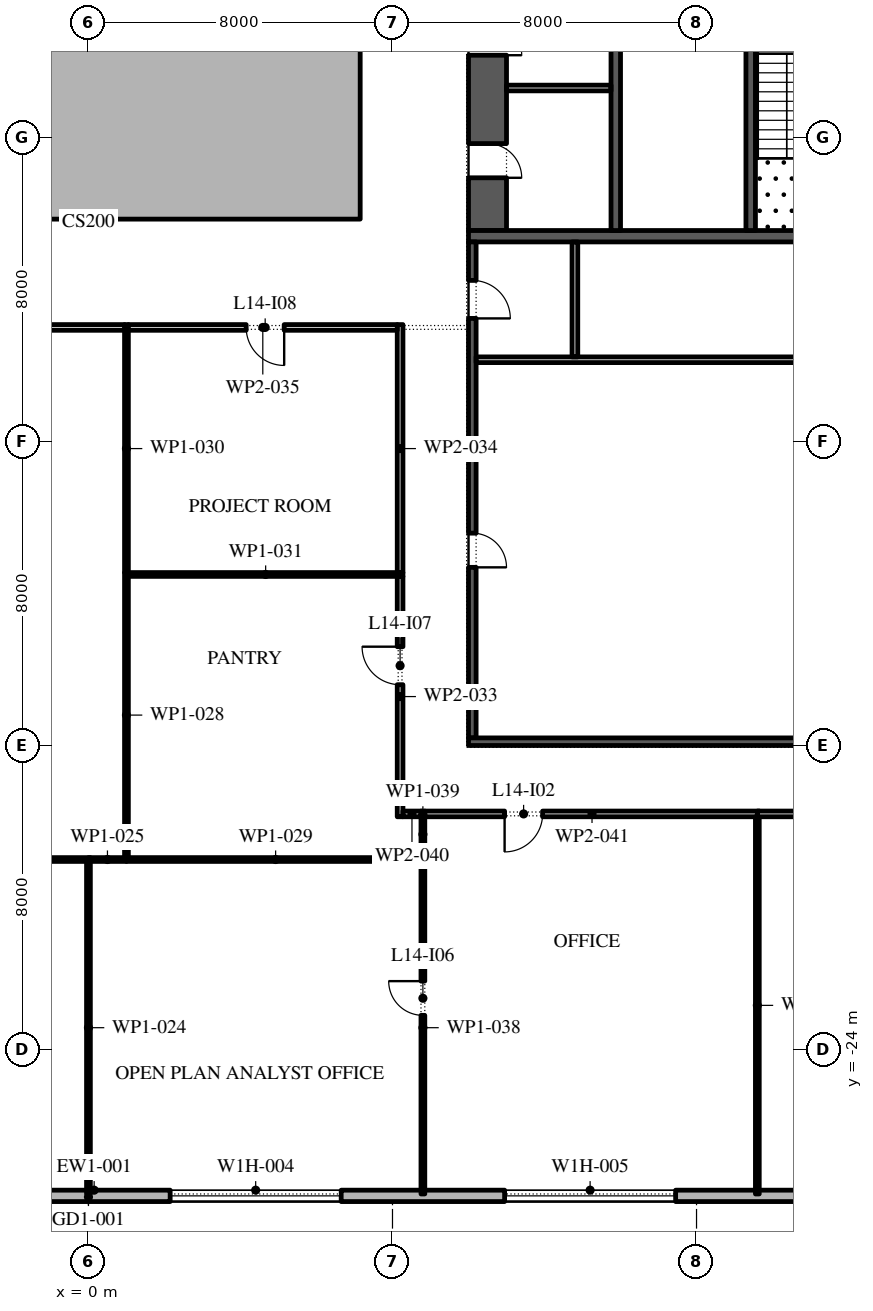
"""IFC4 building model, lengths in metres.
Left out: names, types, materials, properties, quantities, classifications, styles, units other than length and angle.
Written with IfcOpenShell. Run it as: python <this file> out.ifc"""

import sys

from ifc_helpers import new_model, si_unit, direction, frame, frame_2d, origin, place, context, subcontext, project, spatial, polyline, rectangle, outline, extrude, element, fill, save


model = new_model("IFC4")
c1 = context("Model", 3, precision=1e-05, world=origin(), true_north=direction((0.0, 1.0)))
c2 = subcontext(c1, "Body", "Model", "MODEL_VIEW")
j1 = project(units=[si_unit("LENGTHUNIT", "METRE"), si_unit("PLANEANGLEUNIT", "RADIAN")], contexts=[c1])
p1 = place(None, origin())
s1 = spatial("IfcSite", under=j1, at=p1, CompositionType="ELEMENT")
p2 = place(p1, origin())
s2 = spatial("IfcBuilding", under=s1, at=p2, CompositionType="ELEMENT")
p3 = place(p2, frame((0.0, 0.0, 69.0)))
s3 = spatial("IfcBuildingStorey", under=s2, at=p3, CompositionType="ELEMENT", Elevation=69.0)
p4 = place(p3, origin())
e1 = element("IfcWall", 1, at=p4, inside=s3, PredefinedType="STANDARD", context=c2, shape_type="SweptSolid", body=[
    extrude(outline(polyline([(-7.15, -2.15), (7.15, -2.15), (7.15, 16.15), (-7.15, 16.15), (-7.15, -2.15)]), holes=[polyline([(-7.0, -2.0), (-7.0, 16.0), (7.0, 16.0), (7.0, -2.0), (-7.0, -2.0)])]), origin(), (0.0, 0.0, 1.0), 4.0),
])
p5 = place(p3, frame((-26.1, -27.85, 0.0), z_axis=(0.0, 0.0, 1.0), x_axis=(1.0, 0.0, 0.0)))
e2 = element("IfcWall", 2, at=p5, inside=s3, PredefinedType="STANDARD", context=c2, shape_type="SweptSolid", body=[
    extrude(rectangle(XDim=52.5, YDim=0.3, at=frame_2d((26.25, 0.0))), origin(), (0.0, 0.0, 1.0), 4.0),
])
p6 = place(p5, frame((2.0, 0.0, 0.45)))
e3 = element("IfcOpeningElement", 3, at=p6, cuts=e2, PredefinedType="OPENING", context=c2, shape_type="SweptSolid", body=[
    extrude(rectangle(XDim=4.5, YDim=2.75, at=frame_2d((2.25, 1.375))), frame((0.0, 0.16, 0.0), z_axis=(0.0, -1.0, 0.0), x_axis=(1.0, 0.0, 0.0)), (0.0, 0.0, 1.0), 0.32),
])
p7 = place(p5, frame((10.65, 0.0, 0.45)))
e4 = element("IfcOpeningElement", 4, at=p7, cuts=e2, PredefinedType="OPENING", context=c2, shape_type="SweptSolid", body=[
    extrude(rectangle(XDim=4.5, YDim=2.75, at=frame_2d((2.25, 1.375))), frame((0.0, 0.16, 0.0), z_axis=(0.0, -1.0, 0.0), x_axis=(1.0, 0.0, 0.0)), (0.0, 0.0, 1.0), 0.32),
])
p8 = place(p5, frame((20.5, 0.0, 0.0)))
e5 = element("IfcOpeningElement", 5, at=p8, cuts=e2, PredefinedType="OPENING", context=c2, shape_type="SweptSolid", body=[
    extrude(rectangle(XDim=2.4, YDim=3.5, at=frame_2d((1.2, 1.75))), frame((0.0, 0.16, 0.0), z_axis=(0.0, -1.0, 0.0), x_axis=(1.0, 0.0, 0.0)), (0.0, 0.0, 1.0), 0.32),
])
p9 = place(p5, frame((28.25, 0.0, 0.45)))
e6 = element("IfcOpeningElement", 6, at=p9, cuts=e2, PredefinedType="OPENING", context=c2, shape_type="SweptSolid", body=[
    extrude(rectangle(XDim=4.5, YDim=2.75, at=frame_2d((2.25, 1.375))), frame((0.0, 0.16, 0.0), z_axis=(0.0, -1.0, 0.0), x_axis=(1.0, 0.0, 0.0)), (0.0, 0.0, 1.0), 0.32),
])
p10 = place(p5, frame((37.05, 0.0, 0.45)))
e7 = element("IfcOpeningElement", 7, at=p10, cuts=e2, PredefinedType="OPENING", context=c2, shape_type="SweptSolid", body=[
    extrude(rectangle(XDim=4.5, YDim=2.75, at=frame_2d((2.25, 1.375))), frame((0.0, 0.16, 0.0), z_axis=(0.0, -1.0, 0.0), x_axis=(1.0, 0.0, 0.0)), (0.0, 0.0, 1.0), 0.32),
])
p11 = place(p5, frame((45.85, 0.0, 0.45)))
e8 = element("IfcOpeningElement", 8, at=p11, cuts=e2, PredefinedType="OPENING", context=c2, shape_type="SweptSolid", body=[
    extrude(rectangle(XDim=4.5, YDim=2.75, at=frame_2d((2.25, 1.375))), frame((0.0, 0.16, 0.0), z_axis=(0.0, -1.0, 0.0), x_axis=(1.0, 0.0, 0.0)), (0.0, 0.0, 1.0), 0.32),
])
p12 = place(p3, frame((10.5, -2.45, 0.0), z_axis=(0.0, 0.0, 1.0), x_axis=(0.0, 1.0, 0.0)))
e9 = element("IfcWall", 9, at=p12, inside=s3, PredefinedType="SHEAR", context=c2, shape_type="SweptSolid", body=[
    extrude(rectangle(XDim=27.9, YDim=1.0, at=frame_2d((13.95, 0.0))), origin(), (0.0, 0.0, 1.0), 4.0),
])
p13 = place(p12, frame((23.65, 0.0, 0.0)))
e10 = element("IfcOpeningElement", 10, at=p13, cuts=e9, PredefinedType="OPENING", context=c2, shape_type="SweptSolid", body=[
    extrude(rectangle(XDim=2.4, YDim=2.1, at=frame_2d((1.2, 1.05))), frame((0.0, 0.51, 0.0), z_axis=(0.0, -1.0, 0.0), x_axis=(1.0, 0.0, 0.0)), (0.0, 0.0, 1.0), 1.02),
])
p14 = place(p12, frame((1.387, 0.0, 0.0)))
e11 = element("IfcOpeningElement", 11, at=p14, cuts=e9, PredefinedType="OPENING", context=c2, shape_type="SweptSolid", body=[
    extrude(rectangle(XDim=0.9, YDim=2.1, at=frame_2d((0.45, 1.05))), frame((0.0, 0.51, 0.0), z_axis=(0.0, -1.0, 0.0), x_axis=(1.0, 0.0, 0.0)), (0.0, 0.0, 1.0), 1.02),
])
p15 = place(p12, frame((4.613, 0.0, 0.0)))
e12 = element("IfcOpeningElement", 12, at=p15, cuts=e9, PredefinedType="OPENING", context=c2, shape_type="SweptSolid", body=[
    extrude(rectangle(XDim=0.9, YDim=2.1, at=frame_2d((0.45, 1.05))), frame((0.0, 0.51, 0.0), z_axis=(0.0, -1.0, 0.0), x_axis=(1.0, 0.0, 0.0)), (0.0, 0.0, 1.0), 1.02),
])
p16 = place(p3, frame((10.0, -2.6, 0.0), z_axis=(0.0, 0.0, 1.0), x_axis=(1.0, 0.0, 0.0)))
e13 = element("IfcWall", 13, at=p16, inside=s3, PredefinedType="SHEAR", context=c2, shape_type="SweptSolid", body=[
    extrude(rectangle(XDim=12.0, YDim=0.3, at=frame_2d((6.0, 0.0))), origin(), (0.0, 0.0, 1.0), 4.0),
])
p17 = place(p3, frame((17.425, -2.45, 0.0), z_axis=(0.0, 0.0, 1.0), x_axis=(0.0, 1.0, 0.0)))
e14 = element("IfcWall", 14, at=p17, inside=s3, PredefinedType="SHEAR", context=c2, shape_type="SweptSolid", body=[
    extrude(rectangle(XDim=6.3, YDim=0.25, at=frame_2d((3.15, 0.0))), origin(), (0.0, 0.0, 1.0), 4.0),
])
p18 = place(p17, frame((5.05, 0.0, 0.0)))
e15 = element("IfcOpeningElement", 15, at=p18, cuts=e14, PredefinedType="OPENING", context=c2, shape_type="SweptSolid", body=[
    extrude(rectangle(XDim=1.2, YDim=2.1, at=frame_2d((0.6, 1.05))), frame((0.0, 0.135, 0.0), z_axis=(0.0, -1.0, 0.0), x_axis=(1.0, 0.0, 0.0)), (0.0, 0.0, 1.0), 0.27),
])
p19 = place(p3, frame((13.875, -2.45, 0.0), z_axis=(0.0, 0.0, 1.0), x_axis=(0.0, 1.0, 0.0)))
e16 = element("IfcWall", 16, at=p19, inside=s3, PredefinedType="SHEAR", context=c2, shape_type="SweptSolid", body=[
    extrude(rectangle(XDim=21.3, YDim=0.25, at=frame_2d((10.65, 0.0))), origin(), (0.0, 0.0, 1.0), 4.0),
])
p20 = place(p19, frame((11.446, 0.0, 0.0)))
e17 = element("IfcOpeningElement", 17, at=p20, cuts=e16, PredefinedType="OPENING", context=c2, shape_type="SweptSolid", body=[
    extrude(rectangle(XDim=0.9, YDim=2.1, at=frame_2d((0.45, 1.05))), frame((0.0, 0.135, 0.0), z_axis=(0.0, -1.0, 0.0), x_axis=(1.0, 0.0, 0.0)), (0.0, 0.0, 1.0), 0.27),
])
p21 = place(p19, frame((17.725, 0.0, 0.0)))
e18 = element("IfcOpeningElement", 18, at=p21, cuts=e16, PredefinedType="OPENING", context=c2, shape_type="SweptSolid", body=[
    extrude(rectangle(XDim=0.9, YDim=2.1, at=frame_2d((0.45, 1.05))), frame((0.0, 0.135, 0.0), z_axis=(0.0, -1.0, 0.0), x_axis=(1.0, 0.0, 0.0)), (0.0, 0.0, 1.0), 0.27),
])
p22 = place(p19, frame((6.971, 0.0, 0.0)))
e19 = element("IfcOpeningElement", 19, at=p22, cuts=e16, PredefinedType="OPENING", context=c2, shape_type="SweptSolid", body=[
    extrude(rectangle(XDim=1.1, YDim=2.1, at=frame_2d((0.55, 1.05))), frame((0.0, 0.135, 0.0), z_axis=(0.0, -1.0, 0.0), x_axis=(1.0, 0.0, 0.0)), (0.0, 0.0, 1.0), 0.27),
])
p23 = place(p3, frame((11.0, 1.3, 0.0), z_axis=(0.0, 0.0, 1.0), x_axis=(1.0, 0.0, 0.0)))
e20 = element("IfcWall", 20, at=p23, inside=s3, PredefinedType="PARTITIONING", context=c2, shape_type="SweptSolid", body=[
    extrude(rectangle(XDim=2.75, YDim=0.15, at=frame_2d((1.375, 0.0))), origin(), (0.0, 0.0, 1.0), 4.0),
])
p24 = place(p3, frame((10.1, -15.8, 0.0), z_axis=(0.0, 0.0, 1.0), x_axis=(0.0, 1.0, 0.0)))
e21 = element("IfcWall", 21, at=p24, inside=s3, PredefinedType="SHEAR", context=c2, shape_type="SweptSolid", body=[
    extrude(rectangle(XDim=13.05, YDim=0.2, at=frame_2d((6.525, 0.0))), origin(), (0.0, 0.0, 1.0), 4.0),
])
p25 = place(p24, frame((4.488, 0.0, 0.0)))
e22 = element("IfcOpeningElement", 22, at=p25, cuts=e21, PredefinedType="OPENING", context=c2, shape_type="SweptSolid", body=[
    extrude(rectangle(XDim=0.9, YDim=2.1, at=frame_2d((0.45, 1.05))), frame((0.0, 0.11, 0.0), z_axis=(0.0, -1.0, 0.0), x_axis=(1.0, 0.0, 0.0)), (0.0, 0.0, 1.0), 0.22),
])
p26 = place(p24, frame((11.038, 0.0, 0.0)))
e23 = element("IfcOpeningElement", 23, at=p26, cuts=e21, PredefinedType="OPENING", context=c2, shape_type="SweptSolid", body=[
    extrude(rectangle(XDim=1.0, YDim=2.1, at=frame_2d((0.5, 1.05))), frame((0.0, 0.11, 0.0), z_axis=(0.0, -1.0, 0.0), x_axis=(1.0, 0.0, 0.0)), (0.0, 0.0, 1.0), 0.22),
])
p27 = place(p3, frame((10.0, -15.9, 0.0), z_axis=(0.0, 0.0, 1.0), x_axis=(1.0, 0.0, 0.0)))
e24 = element("IfcWall", 24, at=p27, inside=s3, PredefinedType="SHEAR", context=c2, shape_type="SweptSolid", body=[
    extrude(rectangle(XDim=12.0, YDim=0.2, at=frame_2d((6.0, 0.0))), origin(), (0.0, 0.0, 1.0), 4.0),
])
p28 = place(p3, frame((10.2, -5.85, 0.0), z_axis=(0.0, 0.0, 1.0), x_axis=(1.0, 0.0, 0.0)))
e25 = element("IfcWall", 25, at=p28, inside=s3, PredefinedType="PARTITIONING", context=c2, shape_type="SweptSolid", body=[
    extrude(rectangle(XDim=11.6, YDim=0.15, at=frame_2d((5.8, 0.0))), origin(), (0.0, 0.0, 1.0), 4.0),
])
p29 = place(p3, frame((12.8, -5.775, 0.0), z_axis=(0.0, 0.0, 1.0), x_axis=(0.0, 1.0, 0.0)))
e26 = element("IfcWall", 26, at=p29, inside=s3, PredefinedType="PARTITIONING", context=c2, shape_type="SweptSolid", body=[
    extrude(rectangle(XDim=3.025, YDim=0.15, at=frame_2d((1.512, 0.0))), origin(), (0.0, 0.0, 1.0), 4.0),
])
p30 = place(p3, frame((-8.75, -19.0, 0.0), z_axis=(0.0, 0.0, 1.0), x_axis=(1.0, 0.0, 0.0)))
e27 = element("IfcWall", 27, at=p30, inside=s3, PredefinedType="PARTITIONING", context=c2, shape_type="SweptSolid", body=[
    extrude(rectangle(XDim=8.8, YDim=0.1, at=frame_2d((4.4, 0.0))), origin(), (0.0, 0.0, 1.0), 4.0),
])
p31 = place(p3, frame((0.0, -19.05, 0.0), z_axis=(0.0, 0.0, 1.0), x_axis=(0.0, -1.0, 0.0)))
e28 = element("IfcWall", 28, at=p31, inside=s3, PredefinedType="PARTITIONING", context=c2, shape_type="SweptSolid", body=[
    extrude(rectangle(XDim=8.75, YDim=0.1, at=frame_2d((4.375, 0.0))), origin(), (0.0, 0.0, 1.0), 4.0),
])
p32 = place(p3, frame((0.0, -19.0, 0.0), z_axis=(0.0, 0.0, 1.0), x_axis=(1.0, 0.0, 0.0)))
e29 = element("IfcWall", 29, at=p32, inside=s3, PredefinedType="PARTITIONING", context=c2, shape_type="SweptSolid", body=[
    extrude(rectangle(XDim=1.0, YDim=0.1, at=frame_2d((0.5, 0.0))), origin(), (0.0, 0.0, 1.0), 4.0),
])
p33 = place(p3, frame((1.0, -18.95, 0.0), z_axis=(0.0, 0.0, 1.0), x_axis=(0.0, 1.0, 0.0)))
e30 = element("IfcWall", 30, at=p33, inside=s3, PredefinedType="PARTITIONING", context=c2, shape_type="SweptSolid", body=[
    extrude(rectangle(XDim=7.5, YDim=0.1, at=frame_2d((3.75, 0.0))), origin(), (0.0, 0.0, 1.0), 4.0),
])
p34 = place(p3, frame((1.0, -19.0, 0.0), z_axis=(0.0, 0.0, 1.0), x_axis=(1.0, 0.0, 0.0)))
e31 = element("IfcWall", 31, at=p34, inside=s3, PredefinedType="PARTITIONING", context=c2, shape_type="SweptSolid", body=[
    extrude(rectangle(XDim=7.85, YDim=0.1, at=frame_2d((3.925, 0.0))), origin(), (0.0, 0.0, 1.0), 4.0),
])
p35 = place(p3, frame((1.0, -11.45, 0.0), z_axis=(0.0, 0.0, 1.0), x_axis=(0.0, 1.0, 0.0)))
e32 = element("IfcWall", 32, at=p35, inside=s3, PredefinedType="PARTITIONING", context=c2, shape_type="SweptSolid", body=[
    extrude(rectangle(XDim=6.525, YDim=0.1, at=frame_2d((3.262, 0.0))), origin(), (0.0, 0.0, 1.0), 4.0),
])
p36 = place(p3, frame((1.05, -11.5, 0.0), z_axis=(0.0, 0.0, 1.0), x_axis=(1.0, 0.0, 0.0)))
e33 = element("IfcWall", 33, at=p36, inside=s3, PredefinedType="PARTITIONING", context=c2, shape_type="SweptSolid", body=[
    extrude(rectangle(XDim=7.225, YDim=0.1, at=frame_2d((3.612, 0.0))), origin(), (0.0, 0.0, 1.0), 4.0),
])
p37 = place(p3, frame((0.95, -5.0, 0.0), z_axis=(0.0, 0.0, 1.0), x_axis=(-1.0, 0.0, 0.0)))
e34 = element("IfcWall", 34, at=p37, inside=s3, PredefinedType="PARTITIONING", context=c2, shape_type="SweptSolid", body=[
    extrude(rectangle(XDim=9.075, YDim=0.15, at=frame_2d((4.538, 0.0))), origin(), (0.0, 0.0, 1.0), 4.0),
])
p38 = place(p3, frame((8.2, -17.875, 0.0), z_axis=(0.0, 0.0, 1.0), x_axis=(0.0, 1.0, 0.0)))
e35 = element("IfcWall", 35, at=p38, inside=s3, PredefinedType="PARTITIONING", context=c2, shape_type="SweptSolid", body=[
    extrude(rectangle(XDim=6.325, YDim=0.15, at=frame_2d((3.163, 0.0))), origin(), (0.0, 0.0, 1.0), 4.0),
])
p39 = place(p38, frame((3.475, 0.0, 0.0)))
e36 = element("IfcOpeningElement", 36, at=p39, cuts=e35, PredefinedType="OPENING", context=c2, shape_type="SweptSolid", body=[
    extrude(rectangle(XDim=1.0, YDim=2.1, at=frame_2d((0.5, 1.05))), frame((0.0, 0.085, 0.0), z_axis=(0.0, -1.0, 0.0), x_axis=(1.0, 0.0, 0.0)), (0.0, 0.0, 1.0), 0.17),
])
p40 = place(p3, frame((8.2, -11.45, 0.0), z_axis=(0.0, 0.0, 1.0), x_axis=(0.0, 1.0, 0.0)))
e37 = element("IfcWall", 37, at=p40, inside=s3, PredefinedType="PARTITIONING", context=c2, shape_type="SweptSolid", body=[
    extrude(rectangle(XDim=6.525, YDim=0.15, at=frame_2d((3.262, 0.0))), origin(), (0.0, 0.0, 1.0), 4.0),
])
p41 = place(p3, frame((8.125, -5.0, 0.0), z_axis=(0.0, 0.0, 1.0), x_axis=(-1.0, 0.0, 0.0)))
e38 = element("IfcWall", 38, at=p41, inside=s3, PredefinedType="PARTITIONING", context=c2, shape_type="SweptSolid", body=[
    extrude(rectangle(XDim=7.075, YDim=0.15, at=frame_2d((3.538, 0.0))), origin(), (0.0, 0.0, 1.0), 4.0),
])
p42 = place(p41, frame((2.975, 0.0, 0.0)))
e39 = element("IfcOpeningElement", 39, at=p42, cuts=e38, PredefinedType="OPENING", context=c2, shape_type="SweptSolid", body=[
    extrude(rectangle(XDim=1.0, YDim=2.1, at=frame_2d((0.5, 1.05))), frame((0.0, 0.085, 0.0), z_axis=(0.0, -1.0, 0.0), x_axis=(1.0, 0.0, 0.0)), (0.0, 0.0, 1.0), 0.17),
])
p43 = place(p3, frame((8.8, -27.8, 0.0), z_axis=(0.0, 0.0, 1.0), x_axis=(0.0, 1.0, 0.0)))
e40 = element("IfcWall", 40, at=p43, inside=s3, PredefinedType="PARTITIONING", context=c2, shape_type="SweptSolid", body=[
    extrude(rectangle(XDim=8.75, YDim=0.1, at=frame_2d((4.375, 0.0))), origin(), (0.0, 0.0, 1.0), 4.0),
])
p44 = place(p43, frame((4.7, 0.0, 0.0)))
e41 = element("IfcOpeningElement", 41, at=p44, cuts=e40, PredefinedType="OPENING", context=c2, shape_type="SweptSolid", body=[
    extrude(rectangle(XDim=0.9, YDim=2.1, at=frame_2d((0.45, 1.05))), frame((0.0, 0.06, 0.0), z_axis=(0.0, -1.0, 0.0), x_axis=(1.0, 0.0, 0.0)), (0.0, 0.0, 1.0), 0.12),
])
p45 = place(p3, frame((8.8, -18.95, 0.0), z_axis=(0.0, 0.0, 1.0), x_axis=(0.0, 1.0, 0.0)))
e42 = element("IfcWall", 42, at=p45, inside=s3, PredefinedType="PARTITIONING", context=c2, shape_type="SweptSolid", body=[
    extrude(rectangle(XDim=1.225, YDim=0.1, at=frame_2d((0.612, 0.0))), origin(), (0.0, 0.0, 1.0), 4.0),
])
p46 = place(p3, frame((8.75, -17.8, 0.0), z_axis=(0.0, 0.0, 1.0), x_axis=(-1.0, 0.0, 0.0)))
e43 = element("IfcWall", 43, at=p46, inside=s3, PredefinedType="PARTITIONING", context=c2, shape_type="SweptSolid", body=[
    extrude(rectangle(XDim=0.475, YDim=0.15, at=frame_2d((0.238, 0.0))), origin(), (0.0, 0.0, 1.0), 4.0),
])
p47 = place(p3, frame((17.65, -17.8, 0.0), z_axis=(0.0, 0.0, 1.0), x_axis=(-1.0, 0.0, 0.0)))
e44 = element("IfcWall", 44, at=p47, inside=s3, PredefinedType="PARTITIONING", context=c2, shape_type="SweptSolid", body=[
    extrude(rectangle(XDim=8.8, YDim=0.15, at=frame_2d((4.4, 0.0))), origin(), (0.0, 0.0, 1.0), 4.0),
])
p48 = place(p47, frame((5.7, 0.0, 0.0)))
e45 = element("IfcOpeningElement", 45, at=p48, cuts=e44, PredefinedType="OPENING", context=c2, shape_type="SweptSolid", body=[
    extrude(rectangle(XDim=1.0, YDim=2.1, at=frame_2d((0.5, 1.05))), frame((0.0, 0.085, 0.0), z_axis=(0.0, -1.0, 0.0), x_axis=(1.0, 0.0, 0.0)), (0.0, 0.0, 1.0), 0.17),
])
p49 = place(p3, frame((17.6, -17.875, 0.0), z_axis=(0.0, 0.0, 1.0), x_axis=(0.0, -1.0, 0.0)))
e46 = element("IfcWall", 46, at=p49, inside=s3, PredefinedType="PARTITIONING", context=c2, shape_type="SweptSolid", body=[
    extrude(rectangle(XDim=9.925, YDim=0.1, at=frame_2d((4.962, 0.0))), origin(), (0.0, 0.0, 1.0), 4.0),
])
p50 = place(p3, frame((23.875, -17.8, 0.0), z_axis=(0.0, 0.0, 1.0), x_axis=(-1.0, 0.0, 0.0)))
e47 = element("IfcWall", 47, at=p50, inside=s3, PredefinedType="PARTITIONING", context=c2, shape_type="SweptSolid", body=[
    extrude(rectangle(XDim=6.275, YDim=0.15, at=frame_2d((3.137, 0.0))), origin(), (0.0, 0.0, 1.0), 4.0),
])
p51 = place(p9, origin())
e48 = element("IfcWindow", 48, at=p51, inside=s3, PartitioningType="DOUBLE_PANEL_VERTICAL", PredefinedType="WINDOW", context=c2, shape_type="SweptSolid", body=[
    extrude(rectangle(XDim=4.5, YDim=2.75, at=frame_2d((2.25, 1.375))), frame((0.0, 0.03, 0.0), z_axis=(0.0, -1.0, 0.0), x_axis=(1.0, 0.0, 0.0)), (0.0, 0.0, 1.0), 0.06),
])
fill(e6, e48)
p52 = place(p10, origin())
e49 = element("IfcWindow", 49, at=p52, inside=s3, PartitioningType="DOUBLE_PANEL_VERTICAL", PredefinedType="WINDOW", context=c2, shape_type="SweptSolid", body=[
    extrude(rectangle(XDim=4.5, YDim=2.75, at=frame_2d((2.25, 1.375))), frame((0.0, 0.03, 0.0), z_axis=(0.0, -1.0, 0.0), x_axis=(1.0, 0.0, 0.0)), (0.0, 0.0, 1.0), 0.06),
])
fill(e7, e49)
p53 = place(p14, frame((0.9, -0.95, 0.0), z_axis=(0.0, 0.0, 1.0), x_axis=(-1.0, 0.0, 0.0)))
e50 = element("IfcDoor", 50, at=p53, inside=s3, OperationType="SINGLE_SWING_LEFT", PredefinedType="DOOR", context=c2, shape_type="SweptSolid", body=[
    extrude(rectangle(XDim=0.9, YDim=2.1, at=frame_2d((0.45, 1.05))), frame((0.0, -0.45, 0.0), z_axis=(0.0, -1.0, 0.0), x_axis=(1.0, 0.0, 0.0)), (0.0, 0.0, 1.0), 0.05),
])
fill(e11, e50)
p54 = place(p15, frame((0.9, -0.95, 0.0), z_axis=(0.0, 0.0, 1.0), x_axis=(-1.0, 0.0, 0.0)))
e51 = element("IfcDoor", 51, at=p54, inside=s3, OperationType="SINGLE_SWING_LEFT", PredefinedType="DOOR", context=c2, shape_type="SweptSolid", body=[
    extrude(rectangle(XDim=0.9, YDim=2.1, at=frame_2d((0.45, 1.05))), frame((0.0, -0.45, 0.0), z_axis=(0.0, -1.0, 0.0), x_axis=(1.0, 0.0, 0.0)), (0.0, 0.0, 1.0), 0.05),
])
fill(e12, e51)
p55 = place(p25, frame((0.9, -0.15, 0.0), z_axis=(0.0, 0.0, 1.0), x_axis=(-1.0, 0.0, 0.0)))
e52 = element("IfcDoor", 52, at=p55, inside=s3, OperationType="SINGLE_SWING_LEFT", PredefinedType="DOOR", context=c2, shape_type="SweptSolid", body=[
    extrude(rectangle(XDim=0.9, YDim=2.1, at=frame_2d((0.45, 1.05))), frame((0.0, -0.05, 0.0), z_axis=(0.0, -1.0, 0.0), x_axis=(1.0, 0.0, 0.0)), (0.0, 0.0, 1.0), 0.05),
])
fill(e22, e52)
p56 = place(p26, frame((1.0, -0.15, 0.0), z_axis=(0.0, 0.0, 1.0), x_axis=(-1.0, 0.0, 0.0)))
e53 = element("IfcDoor", 53, at=p56, inside=s3, OperationType="SINGLE_SWING_LEFT", PredefinedType="DOOR", context=c2, shape_type="SweptSolid", body=[
    extrude(rectangle(XDim=1.0, YDim=2.1, at=frame_2d((0.5, 1.05))), frame((0.0, -0.05, 0.0), z_axis=(0.0, -1.0, 0.0), x_axis=(1.0, 0.0, 0.0)), (0.0, 0.0, 1.0), 0.05),
])
fill(e23, e53)
p57 = place(p48, origin())
e54 = element("IfcDoor", 54, at=p57, inside=s3, OperationType="SINGLE_SWING_LEFT", PredefinedType="DOOR", context=c2, shape_type="SweptSolid", body=[
    extrude(rectangle(XDim=1.0, YDim=2.1, at=frame_2d((0.5, 1.05))), frame((0.0, 0.025, 0.0), z_axis=(0.0, -1.0, 0.0), x_axis=(1.0, 0.0, 0.0)), (0.0, 0.0, 1.0), 0.05),
])
fill(e45, e54)
p58 = place(p44, origin())
e55 = element("IfcDoor", 55, at=p58, inside=s3, OperationType="SINGLE_SWING_LEFT", PredefinedType="DOOR", context=c2, shape_type="SweptSolid", body=[
    extrude(rectangle(XDim=0.9, YDim=2.1, at=frame_2d((0.45, 1.05))), frame((0.0, 0.025, 0.0), z_axis=(0.0, -1.0, 0.0), x_axis=(1.0, 0.0, 0.0)), (0.0, 0.0, 1.0), 0.05),
])
fill(e41, e55)
p59 = place(p39, origin())
e56 = element("IfcDoor", 56, at=p59, inside=s3, OperationType="SINGLE_SWING_LEFT", PredefinedType="DOOR", context=c2, shape_type="SweptSolid", body=[
    extrude(rectangle(XDim=1.0, YDim=2.1, at=frame_2d((0.5, 1.05))), frame((0.0, 0.025, 0.0), z_axis=(0.0, -1.0, 0.0), x_axis=(1.0, 0.0, 0.0)), (0.0, 0.0, 1.0), 0.05),
])
fill(e36, e56)
p60 = place(p42, origin())
e57 = element("IfcDoor", 57, at=p60, inside=s3, OperationType="SINGLE_SWING_RIGHT", PredefinedType="DOOR", context=c2, shape_type="SweptSolid", body=[
    extrude(rectangle(XDim=1.0, YDim=2.1, at=frame_2d((0.5, 1.05))), frame((0.0, 0.025, 0.0), z_axis=(0.0, -1.0, 0.0), x_axis=(1.0, 0.0, 0.0)), (0.0, 0.0, 1.0), 0.05),
])
fill(e39, e57)
save(model, sys.argv[1])
